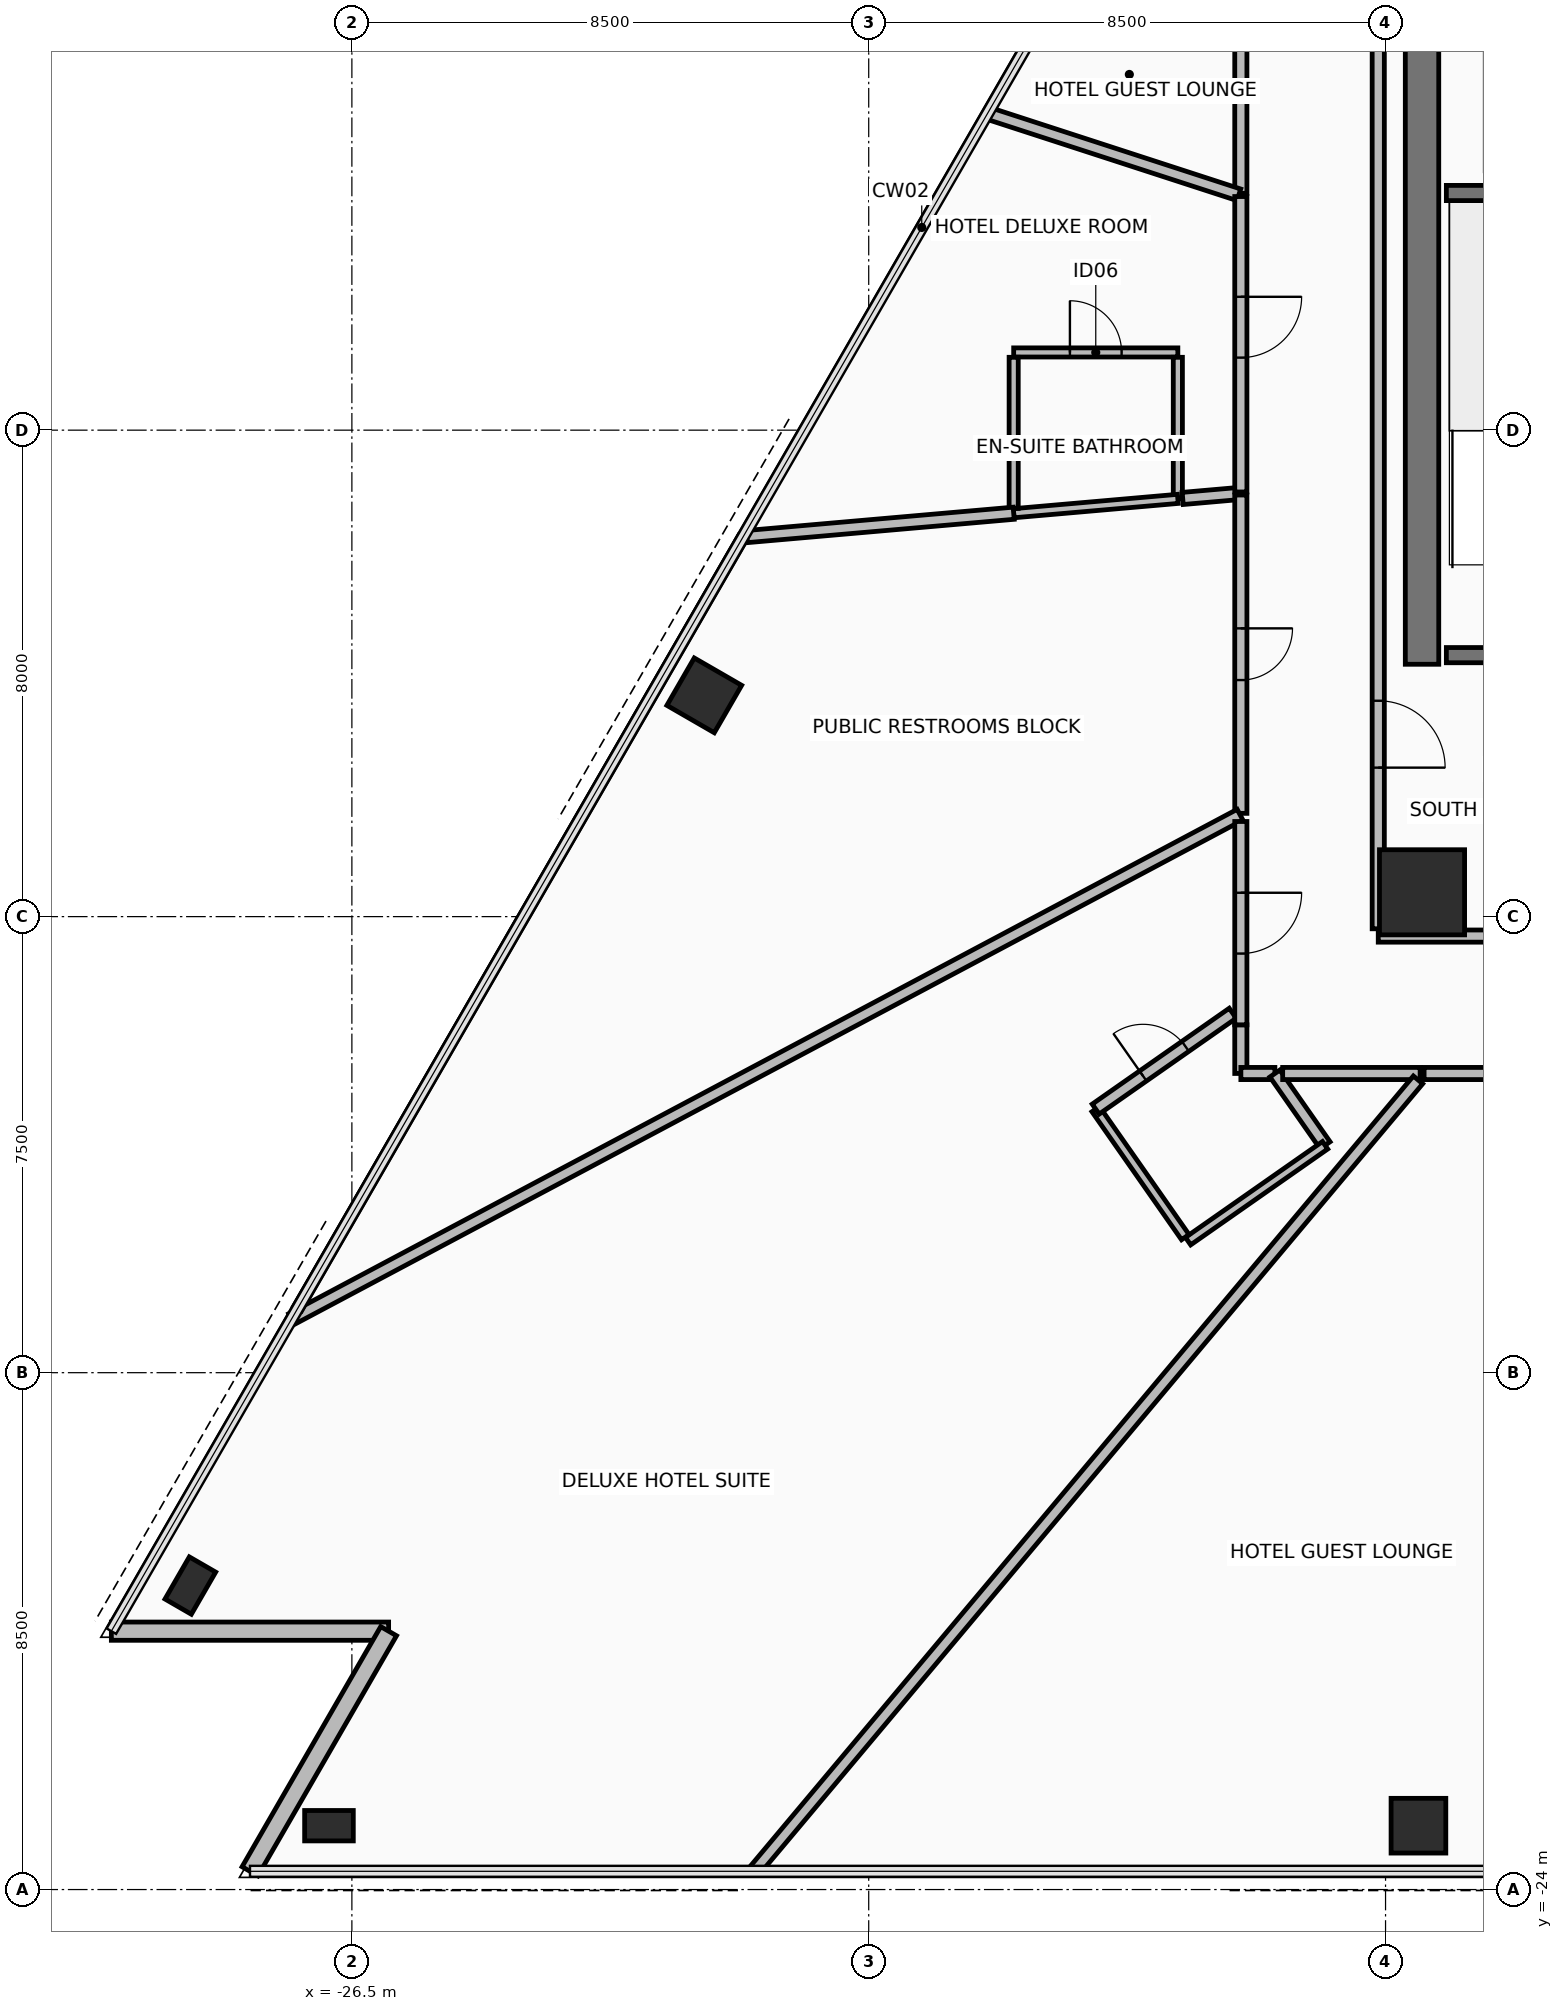
"""IFC4 building model, lengths in metres.
Left out: names, types, materials, properties, quantities, classifications, styles, units other than length and angle.
Written with IfcOpenShell. Run it as: python <this file> out.ifc"""

import sys

from ifc_helpers import new_model, si_unit, direction, frame, frame_2d, origin, origin_2d, place, context, subcontext, project, spatial, rectangle, hollow_rectangle, extrude, element, fill, save


model = new_model("IFC4")
c1 = context("Model", 3, precision=1e-05, world=origin(), true_north=direction((0.0, 1.0)))
c2 = subcontext(c1, "Body", "Model", "MODEL_VIEW")
j1 = project(units=[si_unit("LENGTHUNIT", "METRE"), si_unit("PLANEANGLEUNIT", "RADIAN")], contexts=[c1])
p1 = place(None, origin())
s1 = spatial("IfcSite", under=j1, at=p1, CompositionType="ELEMENT")
p2 = place(p1, origin())
s2 = spatial("IfcBuilding", under=s1, at=p2, CompositionType="ELEMENT")
p3 = place(p2, frame((0.0, 0.0, 38.65)))
s3 = spatial("IfcBuildingStorey", under=s2, at=p3, CompositionType="ELEMENT", Elevation=38.65)
p4 = place(p3, frame((-8.9, -7.6, 0.0), z_axis=(0.0, 0.0, 1.0), x_axis=(1.0, 0.0, 0.0)))
e1 = element("IfcColumn", 1, at=p4, inside=s3, PredefinedType="COLUMN", context=c2, shape_type="SweptSolid", body=[
    extrude(rectangle(XDim=1.4, YDim=1.4, at=origin_2d()), origin(), (0.0, 0.0, 1.0), 3.4),
])
p5 = place(p3, frame((-20.705, -4.361, 0.0), z_axis=(0.0, 0.0, 1.0), x_axis=(0.500001511499, 0.866024531118, 0.0)))
e2 = element("IfcColumn", 2, at=p5, inside=s3, PredefinedType="COLUMN", context=c2, shape_type="SweptSolid", body=[
    extrude(hollow_rectangle(XDim=0.9, YDim=0.9, WallThickness=0.05, at=origin_2d()), origin(), (0.0, 0.0, 1.0), 3.4),
])
for number, where, z_axis, x_axis in (
    (3, (-29.157, -19.001, 0.0), (0.0, 0.0, 1.0), (0.5, 0.866, 0.0)),
    (4, (-26.877, -22.95, 0.0), (0.0, 0.0, 1.0), (1.0, 0.0, 0.0)),
):
    element("IfcColumn", number, at=place(p3, frame(where, z_axis=z_axis, x_axis=x_axis)), inside=s3, PredefinedType="COLUMN", context=c2, shape_type="SweptSolid", body=[
        extrude(hollow_rectangle(XDim=0.5, YDim=0.8, WallThickness=0.04, at=origin_2d()), origin(), (0.0, 0.0, 1.0), 3.4),
    ])
p6 = place(p3, frame((-8.959, -22.95, 0.0), z_axis=(0.0, 0.0, 1.0), x_axis=(1.0, 0.0, 0.0)))
e5 = element("IfcColumn", 5, at=p6, inside=s3, PredefinedType="COLUMN", context=c2, shape_type="SweptSolid", body=[
    extrude(hollow_rectangle(XDim=0.9, YDim=0.9, WallThickness=0.05, at=origin_2d()), origin(), (0.0, 0.0, 1.0), 3.4),
])
p7 = place(p3, frame((-30.456, -19.751, 0.0), z_axis=(0.0, 0.0, 1.0), x_axis=(1.0, 0.0, 0.0)))
e6 = element("IfcWall", 6, at=p7, inside=s3, PredefinedType="STANDARD", context=c2, shape_type="SweptSolid", body=[
    extrude(rectangle(XDim=4.56, YDim=0.3, at=frame_2d((2.28, 0.0))), origin(), (0.0, 0.0, 1.0), 2.42),
])
p8 = place(p3, frame((-25.896, -19.751, 0.0), z_axis=(0.0, 0.0, 1.0), x_axis=(-0.500014431597, -0.866017071537, 0.0)))
e7 = element("IfcWall", 7, at=p8, inside=s3, PredefinedType="STANDARD", context=c2, shape_type="SweptSolid", body=[
    extrude(rectangle(XDim=4.56, YDim=0.3, at=frame_2d((2.28, 0.0))), origin(), (0.0, 0.0, 1.0), 2.42),
])
p9 = place(p3, frame((-8.9, -3.85, 0.0), z_axis=(0.0, 0.0, 1.0), x_axis=(0.0, 1.0, 0.0)))
e8 = element("IfcWall", 8, at=p9, inside=s3, PredefinedType="SHEAR", context=c2, shape_type="SweptSolid", body=[
    extrude(rectangle(XDim=10.7, YDim=0.55, at=frame_2d((5.35, 0.0))), origin(), (0.0, 0.0, 1.0), 3.225),
])
p10 = place(p3, frame((-9.62, -8.32, 0.0), z_axis=(0.0, 0.0, 1.0), x_axis=(1.0, 0.0, 0.0)))
e9 = element("IfcWall", 9, at=p10, inside=s3, PredefinedType="PARTITIONING", context=c2, shape_type="SweptSolid", body=[
    extrude(rectangle(XDim=19.24, YDim=0.2, at=frame_2d((9.62, 0.0))), origin(), (0.0, 0.0, 1.0), 2.62),
])
p11 = place(p10, frame((13.97, 0.0, 0.0)))
e10 = element("IfcOpeningElement", 10, at=p11, cuts=e9, PredefinedType="OPENING", context=c2, shape_type="SweptSolid", body=[
    extrude(rectangle(XDim=0.9, YDim=2.1, at=frame_2d((0.45, 1.05))), frame((0.0, 0.11, 0.0), z_axis=(0.0, -1.0, 0.0), x_axis=(1.0, 0.0, 0.0)), (0.0, 0.0, 1.0), 0.22),
])
p12 = place(p3, frame((-9.62, 8.2, 0.0), z_axis=(0.0, 0.0, 1.0), x_axis=(0.0, -1.0, 0.0)))
e11 = element("IfcWall", 11, at=p12, inside=s3, PredefinedType="PARTITIONING", context=c2, shape_type="SweptSolid", body=[
    extrude(rectangle(XDim=16.4, YDim=0.2, at=frame_2d((8.2, 0.0))), origin(), (0.0, 0.0, 1.0), 2.62),
])
p13 = place(p12, frame((12.65, 0.0, 0.0)))
e12 = element("IfcOpeningElement", 12, at=p13, cuts=e11, PredefinedType="OPENING", context=c2, shape_type="SweptSolid", body=[
    extrude(rectangle(XDim=1.1, YDim=2.15, at=frame_2d((0.55, 1.075))), frame((0.0, 0.11, 0.0), z_axis=(0.0, -1.0, 0.0), x_axis=(1.0, 0.0, 0.0)), (0.0, 0.0, 1.0), 0.22),
])
p14 = place(p3, frame((-8.5, -3.7, 0.0), z_axis=(0.0, 0.0, 1.0), x_axis=(1.0, 0.0, 0.0)))
e13 = element("IfcWall", 13, at=p14, inside=s3, PredefinedType="SHEAR", context=c2, shape_type="SweptSolid", body=[
    extrude(rectangle(XDim=2.95, YDim=0.25, at=frame_2d((1.475, 0.0))), origin(), (0.0, 0.0, 1.0), 3.225),
])
p15 = place(p14, frame((0.9, 0.0, 0.0)))
e14 = element("IfcOpeningElement", 14, at=p15, cuts=e13, PredefinedType="OPENING", context=c2, shape_type="SweptSolid", body=[
    extrude(rectangle(XDim=1.1, YDim=2.15, at=frame_2d((0.55, 1.075))), frame((0.0, 0.135, 0.0), z_axis=(0.0, -1.0, 0.0), x_axis=(1.0, 0.0, 0.0)), (0.0, 0.0, 1.0), 0.27),
])
p16 = place(p3, frame((-8.5, 3.9, 0.0), z_axis=(0.0, 0.0, 1.0), x_axis=(1.0, 0.0, 0.0)))
e15 = element("IfcWall", 15, at=p16, inside=s3, PredefinedType="SHEAR", context=c2, shape_type="SweptSolid", body=[
    extrude(rectangle(XDim=2.95, YDim=0.25, at=frame_2d((1.475, 0.0))), origin(), (0.0, 0.0, 1.0), 3.225),
])
p17 = place(p3, frame((-15.616, 1.278, 0.0), z_axis=(0.0, 0.0, 1.0), x_axis=(1.0, 0.0, 0.0)))
e16 = element("IfcWall", 16, at=p17, inside=s3, PredefinedType="PARTITIONING", context=c2, shape_type="SweptSolid", body=[
    extrude(rectangle(XDim=2.7, YDim=0.15, at=frame_2d((1.35, 0.0))), origin(), (0.0, 0.0, 1.0), 2.82),
])
p18 = place(p17, frame((0.925, 0.0, 0.0)))
e17 = element("IfcOpeningElement", 17, at=p18, cuts=e16, PredefinedType="OPENING", context=c2, shape_type="SweptSolid", body=[
    extrude(rectangle(XDim=0.85, YDim=2.1, at=frame_2d((0.425, 1.05))), frame((0.0, 0.085, 0.0), z_axis=(0.0, -1.0, 0.0), x_axis=(1.0, 0.0, 0.0)), (0.0, 0.0, 1.0), 0.17),
])
p19 = place(p3, frame((-12.916, 1.198, 0.0), z_axis=(0.0, 0.0, 1.0), x_axis=(0.0, -1.0, 0.0)))
e18 = element("IfcWall", 18, at=p19, inside=s3, PredefinedType="PARTITIONING", context=c2, shape_type="SweptSolid", body=[
    extrude(rectangle(XDim=2.328, YDim=0.15, at=frame_2d((1.164, 0.0))), origin(), (0.0, 0.0, 1.0), 2.82),
])
p20 = place(p3, frame((-12.916, -1.13, 0.0), z_axis=(0.0, 0.0, 1.0), x_axis=(-0.996191077086, -0.087197121134, 0.0)))
e19 = element("IfcWall", 19, at=p20, inside=s3, PredefinedType="PARTITIONING", context=c2, shape_type="SweptSolid", body=[
    extrude(rectangle(XDim=2.71, YDim=0.15, at=frame_2d((1.355, 0.0))), origin(), (0.0, 0.0, 1.0), 2.82),
])
p21 = place(p3, frame((-15.616, -1.286, 0.0), z_axis=(0.0, 0.0, 1.0), x_axis=(0.0, 1.0, 0.0)))
e20 = element("IfcWall", 20, at=p21, inside=s3, PredefinedType="PARTITIONING", context=c2, shape_type="SweptSolid", body=[
    extrude(rectangle(XDim=2.484, YDim=0.15, at=frame_2d((1.242, 0.0))), origin(), (0.0, 0.0, 1.0), 2.82),
])
p22 = place(p3, frame((-11.88, -9.78, 0.0), z_axis=(0.0, 0.0, 1.0), x_axis=(0.0, -1.0, 0.0)))
e21 = element("IfcWall", 21, at=p22, inside=s3, PredefinedType="PARTITIONING", context=c2, shape_type="SweptSolid", body=[
    extrude(rectangle(XDim=0.8, YDim=0.2, at=frame_2d((0.4, 0.0))), origin(), (0.0, 0.0, 1.0), 2.62),
])
p23 = place(p3, frame((-11.879, -10.58, 0.0), z_axis=(0.0, 0.0, 1.0), x_axis=(1.0, 0.0, 0.0)))
e22 = element("IfcWall", 22, at=p23, inside=s3, PredefinedType="PARTITIONING", context=c2, shape_type="SweptSolid", body=[
    extrude(rectangle(XDim=0.559, YDim=0.2, at=frame_2d((0.28, 0.0))), origin(), (0.0, 0.0, 1.0), 3.225),
])
p24 = place(p3, frame((-11.32, -10.58, 0.0), z_axis=(0.0, 0.0, 1.0), x_axis=(0.573177949093, -0.819430923674, 0.0)))
e23 = element("IfcWall", 23, at=p24, inside=s3, PredefinedType="PARTITIONING", context=c2, shape_type="SweptSolid", body=[
    extrude(rectangle(XDim=1.44, YDim=0.2, at=frame_2d((0.72, 0.0))), origin(), (0.0, 0.0, 1.0), 3.225),
])
p25 = place(p3, frame((-10.494, -11.76, 0.0), z_axis=(0.0, 0.0, 1.0), x_axis=(-0.819398712469, -0.573223996361, 0.0)))
e24 = element("IfcWall", 24, at=p25, inside=s3, PredefinedType="PARTITIONING", context=c2, shape_type="SweptSolid", body=[
    extrude(rectangle(XDim=2.75, YDim=0.15, at=frame_2d((1.375, 0.0))), origin(), (0.0, 0.0, 1.0), 3.225),
])
p26 = place(p3, frame((-12.794, -13.271, 0.0), z_axis=(0.0, 0.0, 1.0), x_axis=(-0.573130756233, 0.819463932251, 0.0)))
e25 = element("IfcWall", 25, at=p26, inside=s3, PredefinedType="PARTITIONING", context=c2, shape_type="SweptSolid", body=[
    extrude(rectangle(XDim=2.57, YDim=0.15, at=frame_2d((1.285, 0.0))), origin(), (0.0, 0.0, 1.0), 2.62),
])
p27 = place(p3, frame((-14.267, -11.165, 0.0), z_axis=(0.0, 0.0, 1.0), x_axis=(0.81944041023, 0.573164386614, 0.0)))
e26 = element("IfcWall", 26, at=p27, inside=s3, PredefinedType="PARTITIONING", context=c2, shape_type="SweptSolid", body=[
    extrude(rectangle(XDim=2.75, YDim=0.2, at=frame_2d((1.375, 0.0))), origin(), (0.0, 0.0, 1.0), 2.62),
])
p28 = place(p27, frame((0.95, 0.0, 0.0)))
e27 = element("IfcOpeningElement", 27, at=p28, cuts=e26, PredefinedType="OPENING", context=c2, shape_type="SweptSolid", body=[
    extrude(rectangle(XDim=0.85, YDim=2.1, at=frame_2d((0.425, 1.05))), frame((0.0, 0.11, 0.0), z_axis=(0.0, -1.0, 0.0), x_axis=(1.0, 0.0, 0.0)), (0.0, 0.0, 1.0), 0.22),
])
p29 = place(p3, frame((-20.053, -1.754, 0.0), z_axis=(0.0, 0.0, 1.0), x_axis=(0.99619520471, 0.087149951884, 0.0)))
e28 = element("IfcWall", 28, at=p29, inside=s3, PredefinedType="PARTITIONING", context=c2, shape_type="SweptSolid", body=[
    extrude(rectangle(XDim=4.454, YDim=0.2, at=frame_2d((2.227, 0.0))), origin(), (0.0, 0.0, 1.0), 2.42),
])
p30 = place(p3, frame((-12.836, -1.123, 0.0), z_axis=(0.0, 0.0, 1.0), x_axis=(0.996190305678, 0.087205933699, 0.0)))
e29 = element("IfcWall", 29, at=p30, inside=s3, PredefinedType="PARTITIONING", context=c2, shape_type="SweptSolid", body=[
    extrude(rectangle(XDim=0.932, YDim=0.2, at=frame_2d((0.466, 0.0))), origin(), (0.0, 0.0, 1.0), 3.225),
])
p31 = place(p3, frame((-11.88, -1.067, 0.0), z_axis=(0.0, 0.0, 1.0), x_axis=(0.0, -1.0, 0.0)))
e30 = element("IfcWall", 30, at=p31, inside=s3, PredefinedType="PARTITIONING", context=c2, shape_type="SweptSolid", body=[
    extrude(rectangle(XDim=5.235, YDim=0.2, at=frame_2d((2.618, 0.0))), origin(), (0.0, 0.0, 1.0), 3.225),
])
p32 = place(p31, frame((2.193, 0.0, 0.0)))
e31 = element("IfcOpeningElement", 31, at=p32, cuts=e30, PredefinedType="OPENING", context=c2, shape_type="SweptSolid", body=[
    extrude(rectangle(XDim=0.85, YDim=2.1, at=frame_2d((0.425, 1.05))), frame((0.0, 0.11, 0.0), z_axis=(0.0, -1.0, 0.0), x_axis=(1.0, 0.0, 0.0)), (0.0, 0.0, 1.0), 0.22),
])
p33 = place(p3, frame((-11.893, -6.324, 0.0), z_axis=(0.0, 0.0, 1.0), x_axis=(-0.882944790092, -0.469476833985, 0.0)))
e32 = element("IfcWall", 32, at=p33, inside=s3, PredefinedType="PARTITIONING", context=c2, shape_type="SweptSolid", body=[
    extrude(rectangle(XDim=17.667, YDim=0.2, at=frame_2d((8.833, 0.0))), origin(), (0.0, 0.0, 1.0), 2.42),
])
p34 = place(p3, frame((-27.393, -14.446, 0.0), z_axis=(0.0, 0.0, 1.0), x_axis=(0.500003924108, 0.866023138188, 0.0)))
e33 = element("IfcWall", 33, at=p34, inside=s3, PredefinedType="PARTITIONING", context=c2, shape_type="SweptSolid", body=[
    extrude(rectangle(XDim=14.641, YDim=0.15, at=frame_2d((7.321, 0.0))), origin(), (0.0, 0.0, 1.0), 3.225),
])
p35 = place(p3, frame((-11.88, 9.957, 0.0), z_axis=(0.0, 0.0, 1.0), x_axis=(0.0, -1.0, 0.0)))
e34 = element("IfcWall", 34, at=p35, inside=s3, PredefinedType="PARTITIONING", context=c2, shape_type="SweptSolid", body=[
    extrude(rectangle(XDim=6.062, YDim=0.2, at=frame_2d((3.031, 0.0))), origin(), (0.0, 0.0, 1.0), 2.62),
])
p36 = place(p35, frame((2.431, 0.0, 0.0)))
e35 = element("IfcOpeningElement", 35, at=p36, cuts=e34, PredefinedType="OPENING", context=c2, shape_type="SweptSolid", body=[
    extrude(rectangle(XDim=1.2, YDim=2.15, at=frame_2d((0.6, 1.075))), frame((0.0, 0.11, 0.0), z_axis=(0.0, -1.0, 0.0), x_axis=(1.0, 0.0, 0.0)), (0.0, 0.0, 1.0), 0.22),
])
p37 = place(p3, frame((-11.913, 3.871, 0.0), z_axis=(0.0, 0.0, 1.0), x_axis=(-0.951056374556, 0.309017430603, 0.0)))
e36 = element("IfcWall", 36, at=p37, inside=s3, PredefinedType="PARTITIONING", context=c2, shape_type="SweptSolid", body=[
    extrude(rectangle(XDim=4.343, YDim=0.2, at=frame_2d((2.171, 0.0))), origin(), (0.0, 0.0, 1.0), 2.42),
])
p38 = place(p3, frame((-11.88, 3.842, 0.0), z_axis=(0.0, 0.0, 1.0), x_axis=(0.0, -1.0, 0.0)))
e37 = element("IfcWall", 37, at=p38, inside=s3, PredefinedType="PARTITIONING", context=c2, shape_type="SweptSolid", body=[
    extrude(rectangle(XDim=4.858, YDim=0.2, at=frame_2d((2.429, 0.0))), origin(), (0.0, 0.0, 1.0), 3.225),
])
p39 = place(p38, frame((1.649, 0.0, 0.0)))
e38 = element("IfcOpeningElement", 38, at=p39, cuts=e37, PredefinedType="OPENING", context=c2, shape_type="SweptSolid", body=[
    extrude(rectangle(XDim=1.0, YDim=2.15, at=frame_2d((0.5, 1.075))), frame((0.0, 0.11, 0.0), z_axis=(0.0, -1.0, 0.0), x_axis=(1.0, 0.0, 0.0)), (0.0, 0.0, 1.0), 0.22),
])
p40 = place(p3, frame((-11.88, -6.436, 0.0), z_axis=(0.0, 0.0, 1.0), x_axis=(0.0, -1.0, 0.0)))
e39 = element("IfcWall", 39, at=p40, inside=s3, PredefinedType="PARTITIONING", context=c2, shape_type="SweptSolid", body=[
    extrude(rectangle(XDim=3.344, YDim=0.2, at=frame_2d((1.672, 0.0))), origin(), (0.0, 0.0, 1.0), 2.62),
])
p41 = place(p40, frame((1.172, 0.0, 0.0)))
e40 = element("IfcOpeningElement", 40, at=p41, cuts=e39, PredefinedType="OPENING", context=c2, shape_type="SweptSolid", body=[
    extrude(rectangle(XDim=1.0, YDim=2.15, at=frame_2d((0.5, 1.075))), frame((0.0, 0.11, 0.0), z_axis=(0.0, -1.0, 0.0), x_axis=(1.0, 0.0, 0.0)), (0.0, 0.0, 1.0), 0.22),
])
p42 = place(p3, frame((-11.192, -10.58, 0.0), z_axis=(0.0, 0.0, 1.0), x_axis=(1.0, 0.0, 0.0)))
e41 = element("IfcWall", 41, at=p42, inside=s3, PredefinedType="PARTITIONING", context=c2, shape_type="SweptSolid", body=[
    extrude(rectangle(XDim=2.26, YDim=0.2, at=frame_2d((1.13, 0.0))), origin(), (0.0, 0.0, 1.0), 2.62),
])
p43 = place(p3, frame((-8.966, -10.685, 0.0), z_axis=(0.0, 0.0, 1.0), x_axis=(-0.642784617016, -0.766046954258, 0.0)))
e42 = element("IfcWall", 42, at=p43, inside=s3, PredefinedType="PARTITIONING", context=c2, shape_type="SweptSolid", body=[
    extrude(rectangle(XDim=16.978, YDim=0.2, at=frame_2d((8.489, 0.0))), origin(), (0.0, 0.0, 1.0), 2.42),
])
p44 = place(p3, frame((-8.866, -10.58, 0.0), z_axis=(0.0, 0.0, 1.0), x_axis=(1.0, 0.0, 0.0)))
e43 = element("IfcWall", 43, at=p44, inside=s3, PredefinedType="PARTITIONING", context=c2, shape_type="SweptSolid", body=[
    extrude(rectangle(XDim=5.394, YDim=0.2, at=frame_2d((2.697, 0.0))), origin(), (0.0, 0.0, 1.0), 2.62),
])
p45 = place(p44, frame((2.097, 0.0, 0.0)))
e44 = element("IfcOpeningElement", 44, at=p45, cuts=e43, PredefinedType="OPENING", context=c2, shape_type="SweptSolid", body=[
    extrude(rectangle(XDim=1.2, YDim=2.15, at=frame_2d((0.6, 1.075))), frame((0.0, 0.11, 0.0), z_axis=(0.0, -1.0, 0.0), x_axis=(1.0, 0.0, 0.0)), (0.0, 0.0, 1.0), 0.22),
])
p46 = place(p13, frame((1.1, 0.0, 0.0), z_axis=(0.0, 0.0, 1.0), x_axis=(-1.0, 0.0, 0.0)))
e45 = element("IfcDoor", 45, at=p46, inside=s3, OperationType="SINGLE_SWING_LEFT", PredefinedType="DOOR", context=c2, shape_type="SweptSolid", body=[
    extrude(rectangle(XDim=1.1, YDim=2.15, at=frame_2d((0.55, 1.075))), frame((0.0, 0.025, 0.0), z_axis=(0.0, -1.0, 0.0), x_axis=(1.0, 0.0, 0.0)), (0.0, 0.0, 1.0), 0.05),
])
fill(e12, e45)
p47 = place(p18, origin())
e46 = element("IfcDoor", 46, at=p47, inside=s3, OperationType="SINGLE_SWING_RIGHT", PredefinedType="DOOR", context=c2, shape_type="SweptSolid", body=[
    extrude(rectangle(XDim=0.85, YDim=2.1, at=frame_2d((0.425, 1.05))), frame((0.0, 0.025, 0.0), z_axis=(0.0, -1.0, 0.0), x_axis=(1.0, 0.0, 0.0)), (0.0, 0.0, 1.0), 0.05),
])
fill(e17, e46)
p48 = place(p28, origin())
e47 = element("IfcDoor", 47, at=p48, inside=s3, OperationType="SINGLE_SWING_RIGHT", PredefinedType="DOOR", context=c2, shape_type="SweptSolid", body=[
    extrude(rectangle(XDim=0.85, YDim=2.1, at=frame_2d((0.425, 1.05))), frame((0.0, 0.025, 0.0), z_axis=(0.0, -1.0, 0.0), x_axis=(1.0, 0.0, 0.0)), (0.0, 0.0, 1.0), 0.05),
])
fill(e27, e47)
p49 = place(p32, origin())
e48 = element("IfcDoor", 48, at=p49, inside=s3, OperationType="SINGLE_SWING_RIGHT", PredefinedType="DOOR", context=c2, shape_type="SweptSolid", body=[
    extrude(rectangle(XDim=0.85, YDim=2.1, at=frame_2d((0.425, 1.05))), frame((0.0, 0.025, 0.0), z_axis=(0.0, -1.0, 0.0), x_axis=(1.0, 0.0, 0.0)), (0.0, 0.0, 1.0), 0.05),
])
fill(e31, e48)
p50 = place(p39, origin())
e49 = element("IfcDoor", 49, at=p50, inside=s3, OperationType="SINGLE_SWING_LEFT", PredefinedType="DOOR", context=c2, shape_type="SweptSolid", body=[
    extrude(rectangle(XDim=1.0, YDim=2.15, at=frame_2d((0.5, 1.075))), frame((0.0, 0.025, 0.0), z_axis=(0.0, -1.0, 0.0), x_axis=(1.0, 0.0, 0.0)), (0.0, 0.0, 1.0), 0.05),
])
fill(e38, e49)
p51 = place(p41, origin())
e50 = element("IfcDoor", 50, at=p51, inside=s3, OperationType="SINGLE_SWING_LEFT", PredefinedType="DOOR", context=c2, shape_type="SweptSolid", body=[
    extrude(rectangle(XDim=1.0, YDim=2.15, at=frame_2d((0.5, 1.075))), frame((0.0, 0.025, 0.0), z_axis=(0.0, -1.0, 0.0), x_axis=(1.0, 0.0, 0.0)), (0.0, 0.0, 1.0), 0.05),
])
fill(e40, e50)
save(model, sys.argv[1])
